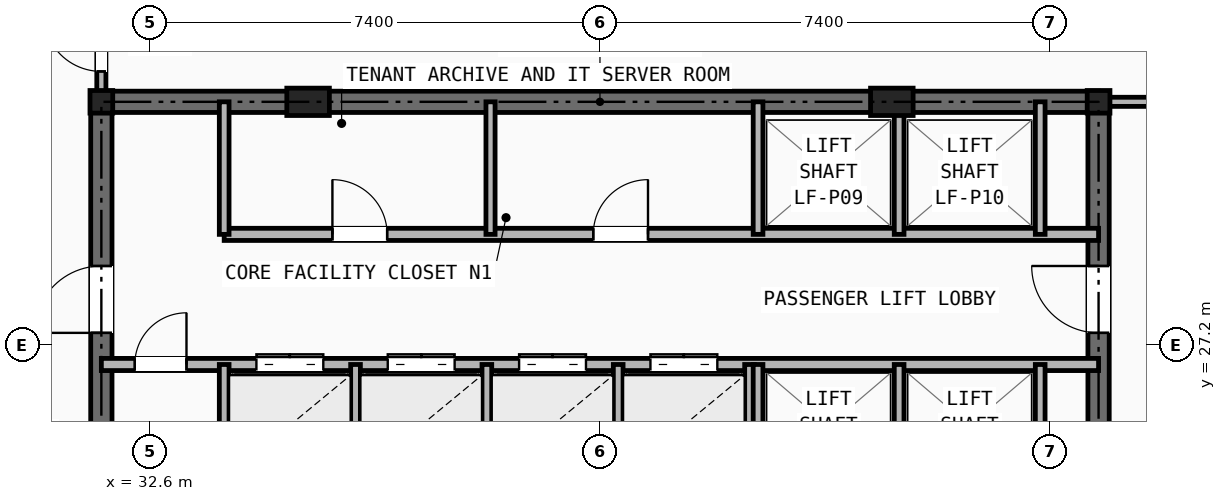
"""IFC4 building model, lengths in metres.
Left out: names, types, materials, properties, quantities, classifications, styles, units other than length and angle.
Written with IfcOpenShell. Run it as: python <this file> out.ifc"""

import sys

from ifc_helpers import new_model, si_unit, direction, frame, frame_2d, origin, origin_2d, place, context, subcontext, project, spatial, rectangle, i_section, extrude, element, fill, save


model = new_model("IFC4")
c1 = context("Model", 3, precision=1e-05, world=origin(), true_north=direction((0.0, 1.0)))
c2 = subcontext(c1, "Body", "Model", "MODEL_VIEW")
j1 = project(units=[si_unit("LENGTHUNIT", "METRE"), si_unit("PLANEANGLEUNIT", "RADIAN")], contexts=[c1])
p1 = place(None, origin())
s1 = spatial("IfcSite", under=j1, at=p1, CompositionType="ELEMENT")
p2 = place(p1, origin())
s2 = spatial("IfcBuilding", under=s1, at=p2, CompositionType="ELEMENT")
p3 = place(p2, frame((0.0, 0.0, 147.05)))
s3 = spatial("IfcBuildingStorey", under=s2, at=p3, CompositionType="ELEMENT", Elevation=147.05)
for number, where, z_axis, x_axis in (
    (1, (31.8, 31.2, 0.0), (0.0, 0.0, 1.0), (1.0, 0.0, 0.0)),
    (2, (48.2, 31.2, 0.0), (0.0, 0.0, 1.0), (1.0, 0.0, 0.0)),
):
    element("IfcColumn", number, at=place(p3, frame(where, z_axis=z_axis, x_axis=x_axis)), inside=s3, PredefinedType="COLUMN", context=c2, shape_type="SweptSolid", body=[
        extrude(i_section(OverallWidth=0.374, OverallDepth=0.372, WebThickness=0.016, FlangeThickness=0.026, at=origin_2d()), origin(), (0.0, 0.0, 1.0), 3.45),
    ])
for number, where, z_axis, x_axis in (
    (3, (35.2, 31.2, 0.0), (0.0, 0.0, 1.0), (1.0, 0.0, 0.0)),
    (4, (44.8, 31.2, 0.0), (0.0, 0.0, 1.0), (1.0, 0.0, 0.0)),
):
    element("IfcColumn", number, at=place(p3, frame(where, z_axis=z_axis, x_axis=x_axis)), inside=s3, PredefinedType="PILASTER", context=c2, shape_type="SweptSolid", body=[
        extrude(rectangle(XDim=0.7, YDim=0.45, at=origin_2d()), origin(), (0.0, 0.0, 1.0), 3.45),
    ])
p4 = place(p3, frame((31.8, 31.2, 0.0), z_axis=(0.0, 0.0, 1.0), x_axis=(1.0, 0.0, 0.0)))
e5 = element("IfcWall", 5, at=p4, inside=s3, PredefinedType="SHEAR", context=c2, shape_type="SweptSolid", body=[
    extrude(rectangle(XDim=16.4, YDim=0.35, at=frame_2d((8.2, 0.0))), origin(), (0.0, 0.0, 1.0), 3.21),
])
p5 = place(p3, frame((31.8, 16.4, 0.0), z_axis=(0.0, 0.0, 1.0), x_axis=(0.0, 1.0, 0.0)))
e6 = element("IfcWall", 6, at=p5, inside=s3, PredefinedType="SHEAR", context=c2, shape_type="SweptSolid", body=[
    extrude(rectangle(XDim=14.8, YDim=0.35, at=frame_2d((7.4, 0.0))), origin(), (0.0, 0.0, 1.0), 3.21),
])
p6 = place(p5, frame((11.0, 0.0, 0.0)))
e7 = element("IfcOpeningElement", 7, at=p6, cuts=e6, PredefinedType="OPENING", context=c2, shape_type="SweptSolid", body=[
    extrude(rectangle(XDim=1.1, YDim=2.15, at=frame_2d((0.55, 1.075))), frame((0.0, 0.185, 0.0), z_axis=(0.0, -1.0, 0.0), x_axis=(1.0, 0.0, 0.0)), (0.0, 0.0, 1.0), 0.37),
])
p7 = place(p3, frame((48.2, 16.4, 0.0), z_axis=(0.0, 0.0, 1.0), x_axis=(0.0, 1.0, 0.0)))
e8 = element("IfcWall", 8, at=p7, inside=s3, PredefinedType="SHEAR", context=c2, shape_type="SweptSolid", body=[
    extrude(rectangle(XDim=14.8, YDim=0.35, at=frame_2d((7.4, 0.0))), origin(), (0.0, 0.0, 1.0), 3.21),
])
p8 = place(p7, frame((11.0, 0.0, 0.0)))
e9 = element("IfcOpeningElement", 9, at=p8, cuts=e8, PredefinedType="OPENING", context=c2, shape_type="SweptSolid", body=[
    extrude(rectangle(XDim=1.1, YDim=2.15, at=frame_2d((0.55, 1.075))), frame((0.0, 0.185, 0.0), z_axis=(0.0, -1.0, 0.0), x_axis=(1.0, 0.0, 0.0)), (0.0, 0.0, 1.0), 0.37),
])
p9 = place(p3, frame((33.82, 29.02, 0.0), z_axis=(0.0, 0.0, 1.0), x_axis=(1.0, 0.0, 0.0)))
e10 = element("IfcWall", 10, at=p9, inside=s3, PredefinedType="SOLIDWALL", context=c2, shape_type="SweptSolid", body=[
    extrude(rectangle(XDim=14.38, YDim=0.2, at=frame_2d((7.19, 0.0))), origin(), (0.0, 0.0, 1.0), 2.661),
])
p10 = place(p9, frame((1.78, 0.0, 0.0)))
e11 = element("IfcOpeningElement", 11, at=p10, cuts=e10, PredefinedType="OPENING", context=c2, shape_type="SweptSolid", body=[
    extrude(rectangle(XDim=0.9, YDim=2.1, at=frame_2d((0.45, 1.05))), frame((0.0, 0.11, 0.0), z_axis=(0.0, -1.0, 0.0), x_axis=(1.0, 0.0, 0.0)), (0.0, 0.0, 1.0), 0.22),
])
p11 = place(p9, frame((6.07, 0.0, 0.0)))
e12 = element("IfcOpeningElement", 12, at=p11, cuts=e10, PredefinedType="OPENING", context=c2, shape_type="SweptSolid", body=[
    extrude(rectangle(XDim=0.9, YDim=2.1, at=frame_2d((0.45, 1.05))), frame((0.0, 0.11, 0.0), z_axis=(0.0, -1.0, 0.0), x_axis=(1.0, 0.0, 0.0)), (0.0, 0.0, 1.0), 0.22),
])
p12 = place(p3, frame((31.8, 26.88, 0.0), z_axis=(0.0, 0.0, 1.0), x_axis=(1.0, 0.0, 0.0)))
e13 = element("IfcWall", 13, at=p12, inside=s3, PredefinedType="SOLIDWALL", context=c2, shape_type="SweptSolid", body=[
    extrude(rectangle(XDim=16.4, YDim=0.2, at=frame_2d((8.2, 0.0))), origin(), (0.0, 0.0, 1.0), 2.661),
])
p13 = place(p12, frame((0.55, 0.0, 0.0)))
e14 = element("IfcOpeningElement", 14, at=p13, cuts=e13, PredefinedType="OPENING", context=c2, shape_type="SweptSolid", body=[
    extrude(rectangle(XDim=0.85, YDim=2.05, at=frame_2d((0.425, 1.025))), frame((0.0, 0.11, 0.0), z_axis=(0.0, -1.0, 0.0), x_axis=(1.0, 0.0, 0.0)), (0.0, 0.0, 1.0), 0.22),
])
p14 = place(p12, frame((2.55, 0.0, 0.0)))
e15 = element("IfcOpeningElement", 15, at=p14, cuts=e13, PredefinedType="OPENING", context=c2, shape_type="SweptSolid", body=[
    extrude(rectangle(XDim=1.1, YDim=2.15, at=frame_2d((0.55, 1.075))), frame((0.0, 0.11, 0.0), z_axis=(0.0, -1.0, 0.0), x_axis=(1.0, 0.0, 0.0)), (0.0, 0.0, 1.0), 0.22),
])
p15 = place(p12, frame((4.71, 0.0, 0.0)))
e16 = element("IfcOpeningElement", 16, at=p15, cuts=e13, PredefinedType="OPENING", context=c2, shape_type="SweptSolid", body=[
    extrude(rectangle(XDim=1.1, YDim=2.15, at=frame_2d((0.55, 1.075))), frame((0.0, 0.11, 0.0), z_axis=(0.0, -1.0, 0.0), x_axis=(1.0, 0.0, 0.0)), (0.0, 0.0, 1.0), 0.22),
])
p16 = place(p12, frame((6.87, 0.0, 0.0)))
e17 = element("IfcOpeningElement", 17, at=p16, cuts=e13, PredefinedType="OPENING", context=c2, shape_type="SweptSolid", body=[
    extrude(rectangle(XDim=1.1, YDim=2.15, at=frame_2d((0.55, 1.075))), frame((0.0, 0.11, 0.0), z_axis=(0.0, -1.0, 0.0), x_axis=(1.0, 0.0, 0.0)), (0.0, 0.0, 1.0), 0.22),
])
p17 = place(p12, frame((9.03, 0.0, 0.0)))
e18 = element("IfcOpeningElement", 18, at=p17, cuts=e13, PredefinedType="OPENING", context=c2, shape_type="SweptSolid", body=[
    extrude(rectangle(XDim=1.1, YDim=2.15, at=frame_2d((0.55, 1.075))), frame((0.0, 0.11, 0.0), z_axis=(0.0, -1.0, 0.0), x_axis=(1.0, 0.0, 0.0)), (0.0, 0.0, 1.0), 0.22),
])
p18 = place(p3, frame((33.82, 29.02, 0.0), z_axis=(0.0, 0.0, 1.0), x_axis=(0.0, 1.0, 0.0)))
e19 = element("IfcWall", 19, at=p18, inside=s3, PredefinedType="SOLIDWALL", context=c2, shape_type="SweptSolid", body=[
    extrude(rectangle(XDim=2.18, YDim=0.16, at=frame_2d((1.09, 0.0))), origin(), (0.0, 0.0, 1.0), 2.661),
])
p19 = place(p3, frame((33.82, 24.8, 0.0), z_axis=(0.0, 0.0, 1.0), x_axis=(0.0, 1.0, 0.0)))
e20 = element("IfcWall", 20, at=p19, inside=s3, PredefinedType="SOLIDWALL", context=c2, shape_type="SweptSolid", body=[
    extrude(rectangle(XDim=2.08, YDim=0.16, at=frame_2d((1.04, 0.0))), origin(), (0.0, 0.0, 1.0), 3.21),
])
p20 = place(p3, frame((38.2, 29.02, 0.0), z_axis=(0.0, 0.0, 1.0), x_axis=(0.0, 1.0, 0.0)))
e21 = element("IfcWall", 21, at=p20, inside=s3, PredefinedType="PARTITIONING", context=c2, shape_type="SweptSolid", body=[
    extrude(rectangle(XDim=2.18, YDim=0.15, at=frame_2d((1.09, 0.0))), origin(), (0.0, 0.0, 1.0), 2.661),
])
for number, where, z_axis, x_axis in (
    (22, (35.98, 24.8, 0.0), (0.0, 0.0, 1.0), (0.0, 1.0, 0.0)),
    (23, (38.14, 24.8, 0.0), (0.0, 0.0, 1.0), (0.0, 1.0, 0.0)),
    (24, (40.3, 24.8, 0.0), (0.0, 0.0, 1.0), (0.0, 1.0, 0.0)),
    (25, (42.46, 24.8, 0.0), (0.0, 0.0, 1.0), (0.0, 1.0, 0.0)),
):
    element("IfcWall", number, at=place(p3, frame(where, z_axis=z_axis, x_axis=x_axis)), inside=s3, PredefinedType="SOLIDWALL", context=c2, shape_type="SweptSolid", body=[
        extrude(rectangle(XDim=2.08, YDim=0.16, at=frame_2d((1.04, 0.0))), origin(), (0.0, 0.0, 1.0), 3.21),
    ])
for number, where, z_axis, x_axis in (
    (26, (42.6, 29.02, 0.0), (0.0, 0.0, 1.0), (0.0, 1.0, 0.0)),
    (27, (44.92, 29.02, 0.0), (0.0, 0.0, 1.0), (0.0, 1.0, 0.0)),
    (28, (47.24, 29.02, 0.0), (0.0, 0.0, 1.0), (0.0, 1.0, 0.0)),
):
    element("IfcWall", number, at=place(p3, frame(where, z_axis=z_axis, x_axis=x_axis)), inside=s3, PredefinedType="SOLIDWALL", context=c2, shape_type="SweptSolid", body=[
        extrude(rectangle(XDim=2.18, YDim=0.16, at=frame_2d((1.09, 0.0))), origin(), (0.0, 0.0, 1.0), 2.661),
    ])
for number, where, z_axis, x_axis in (
    (29, (42.6, 24.8, 0.0), (0.0, 0.0, 1.0), (0.0, 1.0, 0.0)),
    (30, (44.92, 24.8, 0.0), (0.0, 0.0, 1.0), (0.0, 1.0, 0.0)),
    (31, (47.24, 24.8, 0.0), (0.0, 0.0, 1.0), (0.0, 1.0, 0.0)),
):
    element("IfcWall", number, at=place(p3, frame(where, z_axis=z_axis, x_axis=x_axis)), inside=s3, PredefinedType="SOLIDWALL", context=c2, shape_type="SweptSolid", body=[
        extrude(rectangle(XDim=2.08, YDim=0.16, at=frame_2d((1.04, 0.0))), origin(), (0.0, 0.0, 1.0), 3.21),
    ])
p21 = place(p3, frame((31.8, 31.2, 0.0), z_axis=(0.0, 0.0, 1.0), x_axis=(0.0, 1.0, 0.0)))
e32 = element("IfcWall", 32, at=p21, inside=s3, PredefinedType="PARTITIONING", context=c2, shape_type="SweptSolid", body=[
    extrude(rectangle(XDim=5.3, YDim=0.15, at=frame_2d((2.65, 0.0))), origin(), (0.0, 0.0, 1.0), 2.225),
])
p22 = place(p21, frame((0.5, 0.0, 0.0)))
e33 = element("IfcOpeningElement", 33, at=p22, cuts=e32, PredefinedType="OPENING", context=c2, shape_type="SweptSolid", body=[
    extrude(rectangle(XDim=0.95, YDim=2.1, at=frame_2d((0.475, 1.05))), frame((0.0, 0.085, 0.0), z_axis=(0.0, -1.0, 0.0), x_axis=(1.0, 0.0, 0.0)), (0.0, 0.0, 1.0), 0.17),
])
p23 = place(p3, frame((48.2, 31.2, 0.0), z_axis=(0.0, 0.0, 1.0), x_axis=(1.0, 0.0, 0.0)))
e34 = element("IfcWall", 34, at=p23, inside=s3, PredefinedType="PARTITIONING", context=c2, shape_type="SweptSolid", body=[
    extrude(rectangle(XDim=8.332, YDim=0.15, at=frame_2d((4.166, 0.0))), origin(), (0.0, 0.0, 1.0), 2.225),
])
p24 = place(p13, origin())
e35 = element("IfcDoor", 35, at=p24, inside=s3, OperationType="SINGLE_SWING_RIGHT", PredefinedType="DOOR", context=c2, shape_type="SweptSolid", body=[
    extrude(rectangle(XDim=0.85, YDim=2.05, at=frame_2d((0.425, 1.025))), frame((0.0, 0.025, 0.0), z_axis=(0.0, -1.0, 0.0), x_axis=(1.0, 0.0, 0.0)), (0.0, 0.0, 1.0), 0.05),
])
fill(e14, e35)
p25 = place(p6, origin())
e36 = element("IfcDoor", 36, at=p25, inside=s3, OperationType="SINGLE_SWING_LEFT", PredefinedType="DOOR", context=c2, shape_type="SweptSolid", body=[
    extrude(rectangle(XDim=1.1, YDim=2.15, at=frame_2d((0.55, 1.075))), frame((0.0, 0.025, 0.0), z_axis=(0.0, -1.0, 0.0), x_axis=(1.0, 0.0, 0.0)), (0.0, 0.0, 1.0), 0.05),
])
fill(e7, e36)
p26 = place(p8, origin())
e37 = element("IfcDoor", 37, at=p26, inside=s3, OperationType="SINGLE_SWING_RIGHT", PredefinedType="DOOR", context=c2, shape_type="SweptSolid", body=[
    extrude(rectangle(XDim=1.1, YDim=2.15, at=frame_2d((0.55, 1.075))), frame((0.0, 0.025, 0.0), z_axis=(0.0, -1.0, 0.0), x_axis=(1.0, 0.0, 0.0)), (0.0, 0.0, 1.0), 0.05),
])
fill(e9, e37)
p27 = place(p10, origin())
e38 = element("IfcDoor", 38, at=p27, inside=s3, OperationType="SINGLE_SWING_LEFT", PredefinedType="DOOR", context=c2, shape_type="SweptSolid", body=[
    extrude(rectangle(XDim=0.9, YDim=2.1, at=frame_2d((0.45, 1.05))), frame((0.0, 0.025, 0.0), z_axis=(0.0, -1.0, 0.0), x_axis=(1.0, 0.0, 0.0)), (0.0, 0.0, 1.0), 0.05),
])
fill(e11, e38)
p28 = place(p11, origin())
e39 = element("IfcDoor", 39, at=p28, inside=s3, OperationType="SINGLE_SWING_RIGHT", PredefinedType="DOOR", context=c2, shape_type="SweptSolid", body=[
    extrude(rectangle(XDim=0.9, YDim=2.1, at=frame_2d((0.45, 1.05))), frame((0.0, 0.025, 0.0), z_axis=(0.0, -1.0, 0.0), x_axis=(1.0, 0.0, 0.0)), (0.0, 0.0, 1.0), 0.05),
])
fill(e12, e39)
p29 = place(p14, origin())
e40 = element("IfcDoor", 40, at=p29, inside=s3, OperationType="DOUBLE_DOOR_SLIDING", PredefinedType="DOOR", context=c2, shape_type="SweptSolid", body=[
    extrude(rectangle(XDim=1.1, YDim=2.15, at=frame_2d((0.55, 1.075))), frame((0.0, 0.025, 0.0), z_axis=(0.0, -1.0, 0.0), x_axis=(1.0, 0.0, 0.0)), (0.0, 0.0, 1.0), 0.05),
])
fill(e15, e40)
p30 = place(p15, origin())
e41 = element("IfcDoor", 41, at=p30, inside=s3, OperationType="DOUBLE_DOOR_SLIDING", PredefinedType="DOOR", context=c2, shape_type="SweptSolid", body=[
    extrude(rectangle(XDim=1.1, YDim=2.15, at=frame_2d((0.55, 1.075))), frame((0.0, 0.025, 0.0), z_axis=(0.0, -1.0, 0.0), x_axis=(1.0, 0.0, 0.0)), (0.0, 0.0, 1.0), 0.05),
])
fill(e16, e41)
p31 = place(p16, origin())
e42 = element("IfcDoor", 42, at=p31, inside=s3, OperationType="DOUBLE_DOOR_SLIDING", PredefinedType="DOOR", context=c2, shape_type="SweptSolid", body=[
    extrude(rectangle(XDim=1.1, YDim=2.15, at=frame_2d((0.55, 1.075))), frame((0.0, 0.025, 0.0), z_axis=(0.0, -1.0, 0.0), x_axis=(1.0, 0.0, 0.0)), (0.0, 0.0, 1.0), 0.05),
])
fill(e17, e42)
p32 = place(p17, origin())
e43 = element("IfcDoor", 43, at=p32, inside=s3, OperationType="DOUBLE_DOOR_SLIDING", PredefinedType="DOOR", context=c2, shape_type="SweptSolid", body=[
    extrude(rectangle(XDim=1.1, YDim=2.15, at=frame_2d((0.55, 1.075))), frame((0.0, 0.025, 0.0), z_axis=(0.0, -1.0, 0.0), x_axis=(1.0, 0.0, 0.0)), (0.0, 0.0, 1.0), 0.05),
])
fill(e18, e43)
p33 = place(p22, origin())
e44 = element("IfcDoor", 44, at=p33, inside=s3, OperationType="SINGLE_SWING_RIGHT", PredefinedType="DOOR", context=c2, shape_type="SweptSolid", body=[
    extrude(rectangle(XDim=0.95, YDim=2.1, at=frame_2d((0.475, 1.05))), frame((0.0, 0.025, 0.0), z_axis=(0.0, -1.0, 0.0), x_axis=(1.0, 0.0, 0.0)), (0.0, 0.0, 1.0), 0.05),
])
fill(e33, e44)
save(model, sys.argv[1])
